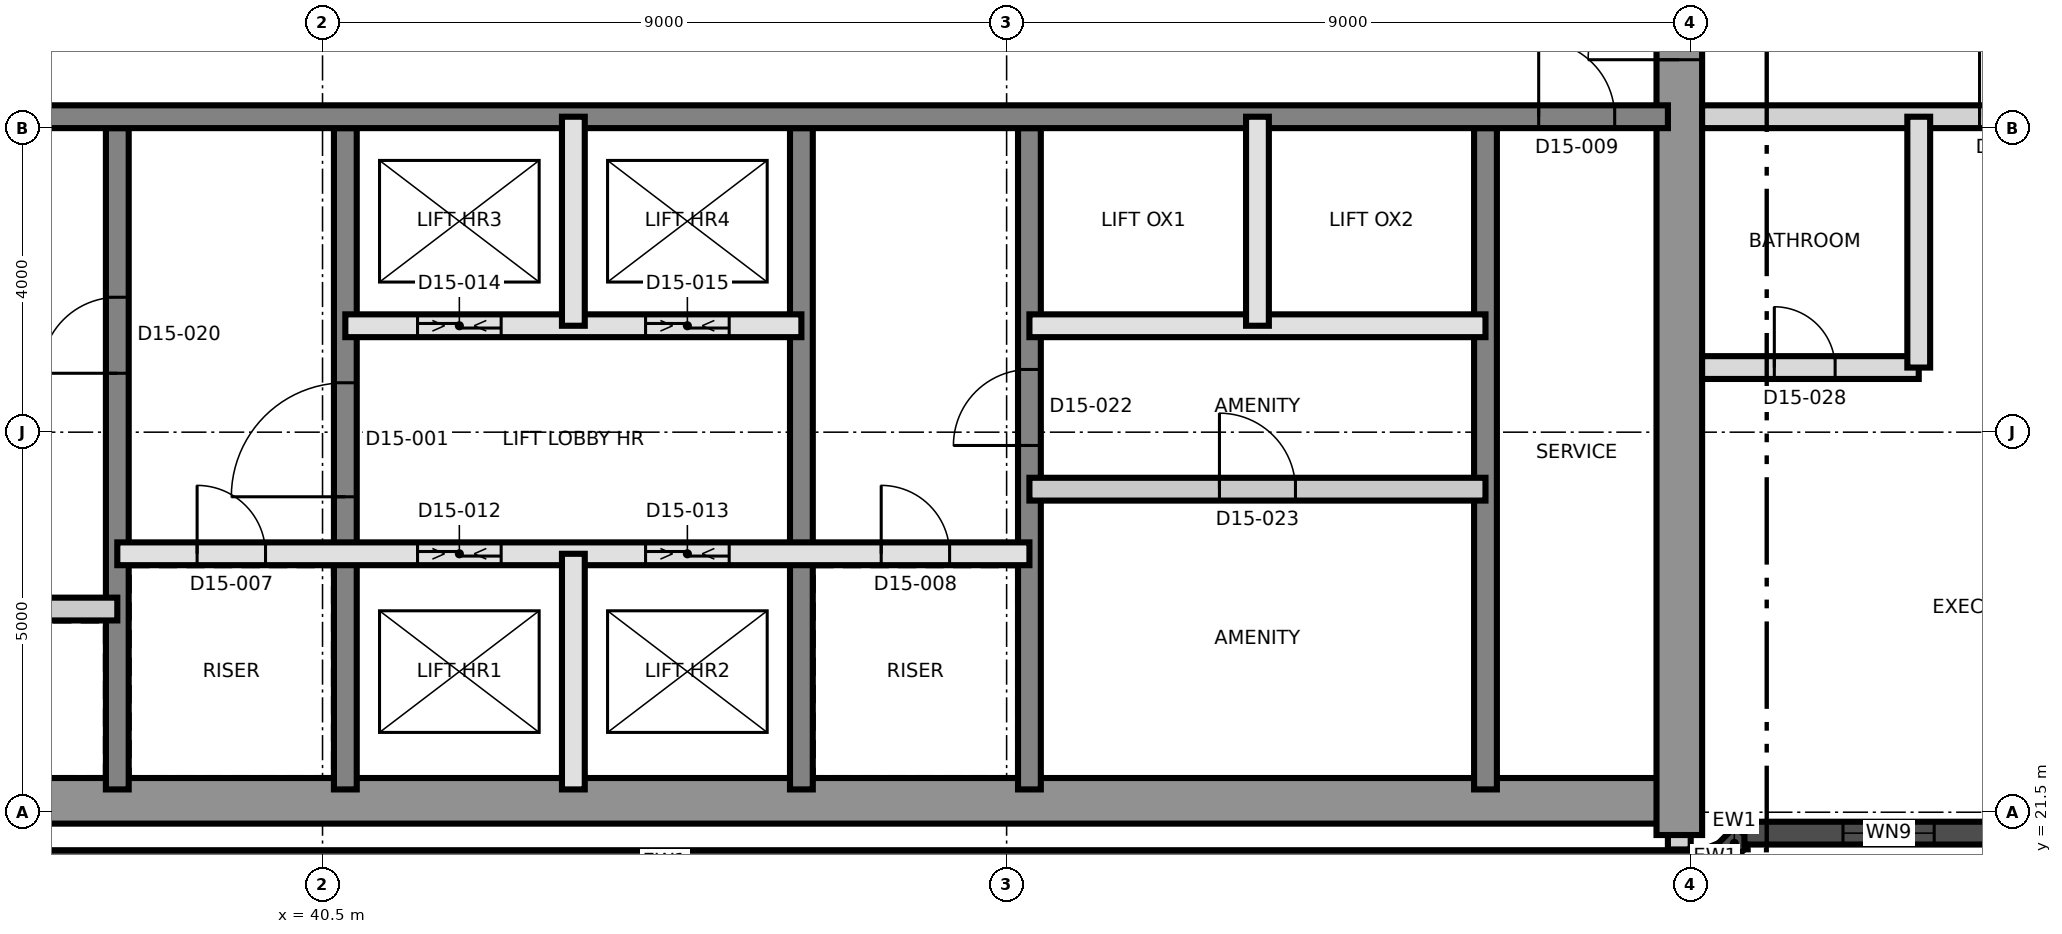
"""IFC4 building model, lengths in metres.
Left out: names, types, materials, properties, quantities, classifications, styles, units other than length and angle.
Written with IfcOpenShell. Run it as: python <this file> out.ifc"""

import sys

from ifc_helpers import new_model, si_unit, direction, frame, frame_2d, origin, place, context, subcontext, project, spatial, rectangle, extrude, element, fill, save


model = new_model("IFC4")
c1 = context("Model", 3, precision=1e-05, world=origin(), true_north=direction((0.0, 1.0)))
c2 = subcontext(c1, "Body", "Model", "MODEL_VIEW")
j1 = project(units=[si_unit("LENGTHUNIT", "METRE"), si_unit("PLANEANGLEUNIT", "RADIAN")], contexts=[c1])
p1 = place(None, origin())
s1 = spatial("IfcSite", under=j1, at=p1, CompositionType="ELEMENT")
p2 = place(p1, origin())
s2 = spatial("IfcBuilding", under=s1, at=p2, CompositionType="ELEMENT")
p3 = place(p2, frame((0.0, 0.0, 157.0)))
s3 = spatial("IfcBuildingStorey", under=s2, at=p3, CompositionType="ELEMENT", Elevation=157.0)
p4 = place(p3, frame((31.2, 21.65, 0.0), z_axis=(0.0, 0.0, 1.0), x_axis=(1.0, 0.0, 0.0)))
e1 = element("IfcWall", 1, at=p4, inside=s3, PredefinedType="SHEAR", context=c2, shape_type="SweptSolid", body=[
    extrude(rectangle(XDim=27.0, YDim=0.6, at=frame_2d((13.5, 0.0))), origin(), (0.0, 0.0, 1.0), 3.7),
])
p5 = place(p3, frame((58.35, 21.2, 0.0), z_axis=(0.0, 0.0, 1.0), x_axis=(0.0, 1.0, 0.0)))
e2 = element("IfcWall", 2, at=p5, inside=s3, PredefinedType="SHEAR", context=c2, shape_type="SweptSolid", body=[
    extrude(rectangle(XDim=18.6, YDim=0.6, at=frame_2d((9.3, 0.0))), origin(), (0.0, 0.0, 1.0), 3.7),
])
p6 = place(p5, frame((10.2, 0.0, 0.0)))
e3 = element("IfcOpeningElement", 3, at=p6, cuts=e2, PredefinedType="OPENING", context=c2, shape_type="SweptSolid", body=[
    extrude(rectangle(XDim=1.2, YDim=2.1, at=frame_2d((0.6, 1.05))), frame((0.0, 0.31, 0.0), z_axis=(0.0, -1.0, 0.0), x_axis=(1.0, 0.0, 0.0)), (0.0, 0.0, 1.0), 0.62),
])
p7 = place(p3, frame((37.8, 21.8, 0.0), z_axis=(0.0, 0.0, 1.0), x_axis=(0.0, 1.0, 0.0)))
e4 = element("IfcWall", 4, at=p7, inside=s3, PredefinedType="SHEAR", context=c2, shape_type="SweptSolid", body=[
    extrude(rectangle(XDim=8.7, YDim=0.3, at=frame_2d((4.35, 0.0))), origin(), (0.0, 0.0, 1.0), 3.7),
])
p8 = place(p7, frame((5.475, 0.0, 0.0)))
e5 = element("IfcOpeningElement", 5, at=p8, cuts=e4, PredefinedType="OPENING", context=c2, shape_type="SweptSolid", body=[
    extrude(rectangle(XDim=1.0, YDim=2.1, at=frame_2d((0.5, 1.05))), frame((0.0, 0.16, 0.0), z_axis=(0.0, -1.0, 0.0), x_axis=(1.0, 0.0, 0.0)), (0.0, 0.0, 1.0), 0.32),
])
p9 = place(p3, frame((40.8, 21.8, 0.0), z_axis=(0.0, 0.0, 1.0), x_axis=(0.0, 1.0, 0.0)))
e6 = element("IfcWall", 6, at=p9, inside=s3, PredefinedType="SHEAR", context=c2, shape_type="SweptSolid", body=[
    extrude(rectangle(XDim=8.7, YDim=0.3, at=frame_2d((4.35, 0.0))), origin(), (0.0, 0.0, 1.0), 3.7),
])
p10 = place(p9, frame((3.85, 0.0, 0.0)))
e7 = element("IfcOpeningElement", 7, at=p10, cuts=e6, PredefinedType="OPENING", context=c2, shape_type="SweptSolid", body=[
    extrude(rectangle(XDim=1.5, YDim=2.1, at=frame_2d((0.75, 1.05))), frame((0.0, 0.16, 0.0), z_axis=(0.0, -1.0, 0.0), x_axis=(1.0, 0.0, 0.0)), (0.0, 0.0, 1.0), 0.32),
])
p11 = place(p3, frame((46.8, 21.8, 0.0), z_axis=(0.0, 0.0, 1.0), x_axis=(0.0, 1.0, 0.0)))
e8 = element("IfcWall", 8, at=p11, inside=s3, PredefinedType="SHEAR", context=c2, shape_type="SweptSolid", body=[
    extrude(rectangle(XDim=8.7, YDim=0.3, at=frame_2d((4.35, 0.0))), origin(), (0.0, 0.0, 1.0), 3.7),
])
p12 = place(p3, frame((49.8, 21.8, 0.0), z_axis=(0.0, 0.0, 1.0), x_axis=(0.0, 1.0, 0.0)))
e9 = element("IfcWall", 9, at=p12, inside=s3, PredefinedType="SHEAR", context=c2, shape_type="SweptSolid", body=[
    extrude(rectangle(XDim=8.7, YDim=0.3, at=frame_2d((4.35, 0.0))), origin(), (0.0, 0.0, 1.0), 3.7),
])
p13 = place(p12, frame((4.525, 0.0, 0.0)))
e10 = element("IfcOpeningElement", 10, at=p13, cuts=e9, PredefinedType="OPENING", context=c2, shape_type="SweptSolid", body=[
    extrude(rectangle(XDim=1.0, YDim=2.1, at=frame_2d((0.5, 1.05))), frame((0.0, 0.16, 0.0), z_axis=(0.0, -1.0, 0.0), x_axis=(1.0, 0.0, 0.0)), (0.0, 0.0, 1.0), 0.32),
])
p14 = place(p3, frame((55.8, 21.8, 0.0), z_axis=(0.0, 0.0, 1.0), x_axis=(0.0, 1.0, 0.0)))
e11 = element("IfcWall", 11, at=p14, inside=s3, PredefinedType="SHEAR", context=c2, shape_type="SweptSolid", body=[
    extrude(rectangle(XDim=8.7, YDim=0.3, at=frame_2d((4.35, 0.0))), origin(), (0.0, 0.0, 1.0), 3.7),
])
p15 = place(p3, frame((31.8, 30.65, 0.0), z_axis=(0.0, 0.0, 1.0), x_axis=(1.0, 0.0, 0.0)))
e12 = element("IfcWall", 12, at=p15, inside=s3, PredefinedType="SHEAR", context=c2, shape_type="SweptSolid", body=[
    extrude(rectangle(XDim=26.4, YDim=0.3, at=frame_2d((13.2, 0.0))), origin(), (0.0, 0.0, 1.0), 3.7),
])
p16 = place(p15, frame((24.7, 0.0, 0.0)))
e13 = element("IfcOpeningElement", 13, at=p16, cuts=e12, PredefinedType="OPENING", context=c2, shape_type="SweptSolid", body=[
    extrude(rectangle(XDim=1.0, YDim=2.1, at=frame_2d((0.5, 1.05))), frame((0.0, 0.16, 0.0), z_axis=(0.0, -1.0, 0.0), x_axis=(1.0, 0.0, 0.0)), (0.0, 0.0, 1.0), 0.32),
])
p17 = place(p3, frame((31.36, 20.85, 0.0), z_axis=(0.0, 0.0, 1.0), x_axis=(1.0, 0.0, 0.0)))
e14 = element("IfcWall", 14, at=p17, inside=s3, PredefinedType="SOLIDWALL", context=c2, shape_type="SweptSolid", body=[
    extrude(rectangle(XDim=27.281, YDim=0.3, at=frame_2d((13.64, 0.0))), origin(), (0.0, 0.0, 1.0), 3.4),
])
p18 = place(p3, frame((58.698, 20.861, 0.0), z_axis=(0.0, 0.0, 1.0), x_axis=(0.923757413239, 0.38297812142, 0.0)))
e15 = element("IfcWall", 15, at=p18, inside=s3, PredefinedType="SOLIDWALL", context=c2, shape_type="SweptSolid", body=[
    extrude(rectangle(XDim=0.275, YDim=0.3, at=frame_2d((0.138, 0.0))), origin(), (0.0, 0.0, 1.0), 3.4),
])
p19 = place(p3, frame((58.952, 20.967, 0.0), z_axis=(0.0, 0.0, 1.0), x_axis=(0.702144810536, 0.712034174065, 0.0)))
e16 = element("IfcWall", 16, at=p19, inside=s3, PredefinedType="SOLIDWALL", context=c2, shape_type="SweptSolid", body=[
    extrude(rectangle(XDim=0.346, YDim=0.3, at=frame_2d((0.173, 0.0))), origin(), (0.0, 0.0, 1.0), 3.4),
])
p20 = place(p3, frame((59.207, 21.225, 0.0), z_axis=(0.0, 0.0, 1.0), x_axis=(1.0, 0.0, 0.0)))
e17 = element("IfcWall", 17, at=p20, inside=s3, PredefinedType="SOLIDWALL", context=c2, shape_type="SweptSolid", body=[
    extrude(rectangle(XDim=8.213, YDim=0.3, at=frame_2d((4.106, 0.0))), origin(), (0.0, 0.0, 1.0), 3.4),
])
p21 = place(p20, frame((1.297, 0.0, 0.9)))
e18 = element("IfcOpeningElement", 18, at=p21, cuts=e17, PredefinedType="OPENING", context=c2, shape_type="SweptSolid", body=[
    extrude(rectangle(XDim=1.2, YDim=1.5, at=frame_2d((0.6, 0.75))), frame((0.0, 0.16, 0.0), z_axis=(0.0, -1.0, 0.0), x_axis=(1.0, 0.0, 0.0)), (0.0, 0.0, 1.0), 0.32),
])
p22 = place(p20, frame((4.003, 0.0, 0.9)))
e19 = element("IfcOpeningElement", 19, at=p22, cuts=e17, PredefinedType="OPENING", context=c2, shape_type="SweptSolid", body=[
    extrude(rectangle(XDim=3.6, YDim=1.5, at=frame_2d((1.8, 0.75))), frame((0.0, 0.16, 0.0), z_axis=(0.0, -1.0, 0.0), x_axis=(1.0, 0.0, 0.0)), (0.0, 0.0, 1.0), 0.32),
])
p23 = place(p3, frame((31.8, 24.173, 0.0), z_axis=(0.0, 0.0, 1.0), x_axis=(1.0, 0.0, 0.0)))
e20 = element("IfcWall", 20, at=p23, inside=s3, PredefinedType="PARTITIONING", context=c2, shape_type="SweptSolid", body=[
    extrude(rectangle(XDim=6.0, YDim=0.3, at=frame_2d((3.0, 0.0))), origin(), (0.0, 0.0, 1.0), 3.4),
])
p24 = place(p23, frame((2.5, 0.0, 0.0)))
e21 = element("IfcOpeningElement", 21, at=p24, cuts=e20, PredefinedType="OPENING", context=c2, shape_type="SweptSolid", body=[
    extrude(rectangle(XDim=1.0, YDim=2.1, at=frame_2d((0.5, 1.05))), frame((0.0, 0.16, 0.0), z_axis=(0.0, -1.0, 0.0), x_axis=(1.0, 0.0, 0.0)), (0.0, 0.0, 1.0), 0.32),
])
p25 = place(p3, frame((37.8, 24.9, 0.0), z_axis=(0.0, 0.0, 1.0), x_axis=(1.0, 0.0, 0.0)))
e22 = element("IfcWall", 22, at=p25, inside=s3, PredefinedType="SOLIDWALL", context=c2, shape_type="SweptSolid", body=[
    extrude(rectangle(XDim=12.0, YDim=0.3, at=frame_2d((6.0, 0.0))), origin(), (0.0, 0.0, 1.0), 3.4),
])
p26 = place(p25, frame((1.05, 0.0, 0.0)))
e23 = element("IfcOpeningElement", 23, at=p26, cuts=e22, PredefinedType="OPENING", context=c2, shape_type="SweptSolid", body=[
    extrude(rectangle(XDim=0.9, YDim=2.1, at=frame_2d((0.45, 1.05))), frame((0.0, 0.16, 0.0), z_axis=(0.0, -1.0, 0.0), x_axis=(1.0, 0.0, 0.0)), (0.0, 0.0, 1.0), 0.32),
])
p27 = place(p25, frame((10.05, 0.0, 0.0)))
e24 = element("IfcOpeningElement", 24, at=p27, cuts=e22, PredefinedType="OPENING", context=c2, shape_type="SweptSolid", body=[
    extrude(rectangle(XDim=0.9, YDim=2.1, at=frame_2d((0.45, 1.05))), frame((0.0, 0.16, 0.0), z_axis=(0.0, -1.0, 0.0), x_axis=(1.0, 0.0, 0.0)), (0.0, 0.0, 1.0), 0.32),
])
p28 = place(p25, frame((3.95, 0.0, 0.0)))
e25 = element("IfcOpeningElement", 25, at=p28, cuts=e22, PredefinedType="OPENING", context=c2, shape_type="SweptSolid", body=[
    extrude(rectangle(XDim=1.1, YDim=2.4, at=frame_2d((0.55, 1.2))), frame((0.0, 0.16, 0.0), z_axis=(0.0, -1.0, 0.0), x_axis=(1.0, 0.0, 0.0)), (0.0, 0.0, 1.0), 0.32),
])
p29 = place(p25, frame((6.95, 0.0, 0.0)))
e26 = element("IfcOpeningElement", 26, at=p29, cuts=e22, PredefinedType="OPENING", context=c2, shape_type="SweptSolid", body=[
    extrude(rectangle(XDim=1.1, YDim=2.4, at=frame_2d((0.55, 1.2))), frame((0.0, 0.16, 0.0), z_axis=(0.0, -1.0, 0.0), x_axis=(1.0, 0.0, 0.0)), (0.0, 0.0, 1.0), 0.32),
])
p30 = place(p3, frame((49.8, 25.75, 0.0), z_axis=(0.0, 0.0, 1.0), x_axis=(1.0, 0.0, 0.0)))
e27 = element("IfcWall", 27, at=p30, inside=s3, PredefinedType="PARTITIONING", context=c2, shape_type="SweptSolid", body=[
    extrude(rectangle(XDim=6.0, YDim=0.3, at=frame_2d((3.0, 0.0))), origin(), (0.0, 0.0, 1.0), 3.4),
])
p31 = place(p30, frame((2.5, 0.0, 0.0)))
e28 = element("IfcOpeningElement", 28, at=p31, cuts=e27, PredefinedType="OPENING", context=c2, shape_type="SweptSolid", body=[
    extrude(rectangle(XDim=1.0, YDim=2.1, at=frame_2d((0.5, 1.05))), frame((0.0, 0.16, 0.0), z_axis=(0.0, -1.0, 0.0), x_axis=(1.0, 0.0, 0.0)), (0.0, 0.0, 1.0), 0.32),
])
p32 = place(p3, frame((40.8, 27.9, 0.0), z_axis=(0.0, 0.0, 1.0), x_axis=(1.0, 0.0, 0.0)))
e29 = element("IfcWall", 29, at=p32, inside=s3, PredefinedType="SOLIDWALL", context=c2, shape_type="SweptSolid", body=[
    extrude(rectangle(XDim=6.0, YDim=0.3, at=frame_2d((3.0, 0.0))), origin(), (0.0, 0.0, 1.0), 3.4),
])
p33 = place(p32, frame((0.95, 0.0, 0.0)))
e30 = element("IfcOpeningElement", 30, at=p33, cuts=e29, PredefinedType="OPENING", context=c2, shape_type="SweptSolid", body=[
    extrude(rectangle(XDim=1.1, YDim=2.4, at=frame_2d((0.55, 1.2))), frame((0.0, 0.16, 0.0), z_axis=(0.0, -1.0, 0.0), x_axis=(1.0, 0.0, 0.0)), (0.0, 0.0, 1.0), 0.32),
])
p34 = place(p32, frame((3.95, 0.0, 0.0)))
e31 = element("IfcOpeningElement", 31, at=p34, cuts=e29, PredefinedType="OPENING", context=c2, shape_type="SweptSolid", body=[
    extrude(rectangle(XDim=1.1, YDim=2.4, at=frame_2d((0.55, 1.2))), frame((0.0, 0.16, 0.0), z_axis=(0.0, -1.0, 0.0), x_axis=(1.0, 0.0, 0.0)), (0.0, 0.0, 1.0), 0.32),
])
p35 = place(p3, frame((49.8, 27.9, 0.0), z_axis=(0.0, 0.0, 1.0), x_axis=(1.0, 0.0, 0.0)))
e32 = element("IfcWall", 32, at=p35, inside=s3, PredefinedType="SOLIDWALL", context=c2, shape_type="SweptSolid", body=[
    extrude(rectangle(XDim=6.0, YDim=0.3, at=frame_2d((3.0, 0.0))), origin(), (0.0, 0.0, 1.0), 3.4),
])
p36 = place(p3, frame((43.8, 21.8, 0.0), z_axis=(0.0, 0.0, 1.0), x_axis=(0.0, 1.0, 0.0)))
e33 = element("IfcWall", 33, at=p36, inside=s3, PredefinedType="SOLIDWALL", context=c2, shape_type="SweptSolid", body=[
    extrude(rectangle(XDim=3.1, YDim=0.3, at=frame_2d((1.55, 0.0))), origin(), (0.0, 0.0, 1.0), 3.4),
])
for number, where, z_axis, x_axis in (
    (34, (43.8, 27.9, 0.0), (0.0, 0.0, 1.0), (0.0, 1.0, 0.0)),
    (35, (52.8, 27.9, 0.0), (0.0, 0.0, 1.0), (0.0, 1.0, 0.0)),
):
    element("IfcWall", number, at=place(p3, frame(where, z_axis=z_axis, x_axis=x_axis)), inside=s3, PredefinedType="SOLIDWALL", context=c2, shape_type="SweptSolid", body=[
        extrude(rectangle(XDim=2.75, YDim=0.3, at=frame_2d((1.375, 0.0))), origin(), (0.0, 0.0, 1.0), 3.4),
    ])
p37 = place(p3, frame((58.65, 27.35, 0.0), z_axis=(0.0, 0.0, 1.0), x_axis=(1.0, 0.0, 0.0)))
e36 = element("IfcWall", 36, at=p37, inside=s3, PredefinedType="PARTITIONING", context=c2, shape_type="SweptSolid", body=[
    extrude(rectangle(XDim=2.85, YDim=0.3, at=frame_2d((1.425, 0.0))), origin(), (0.0, 0.0, 1.0), 3.4),
])
p38 = place(p37, frame((0.95, 0.0, 0.0)))
e37 = element("IfcOpeningElement", 37, at=p38, cuts=e36, PredefinedType="OPENING", context=c2, shape_type="SweptSolid", body=[
    extrude(rectangle(XDim=0.8, YDim=2.1, at=frame_2d((0.4, 1.05))), frame((0.0, 0.16, 0.0), z_axis=(0.0, -1.0, 0.0), x_axis=(1.0, 0.0, 0.0)), (0.0, 0.0, 1.0), 0.32),
])
p39 = place(p3, frame((58.65, 30.65, 0.0), z_axis=(0.0, 0.0, 1.0), x_axis=(1.0, 0.0, 0.0)))
e38 = element("IfcWall", 38, at=p39, inside=s3, PredefinedType="PARTITIONING", context=c2, shape_type="SweptSolid", body=[
    extrude(rectangle(XDim=8.5, YDim=0.3, at=frame_2d((4.25, 0.0))), origin(), (0.0, 0.0, 1.0), 3.4),
])
p40 = place(p39, frame((3.65, 0.0, 0.0)))
e39 = element("IfcOpeningElement", 39, at=p40, cuts=e38, PredefinedType="OPENING", context=c2, shape_type="SweptSolid", body=[
    extrude(rectangle(XDim=1.0, YDim=2.4, at=frame_2d((0.5, 1.2))), frame((0.0, 0.16, 0.0), z_axis=(0.0, -1.0, 0.0), x_axis=(1.0, 0.0, 0.0)), (0.0, 0.0, 1.0), 0.32),
])
p41 = place(p3, frame((61.5, 27.35, 0.0), z_axis=(0.0, 0.0, 1.0), x_axis=(0.0, 1.0, 0.0)))
e40 = element("IfcWall", 40, at=p41, inside=s3, PredefinedType="PARTITIONING", context=c2, shape_type="SweptSolid", body=[
    extrude(rectangle(XDim=3.3, YDim=0.3, at=frame_2d((1.65, 0.0))), origin(), (0.0, 0.0, 1.0), 3.4),
])
p42 = place(p3, frame((58.35, 21.2, 0.0), z_axis=(0.0, 0.0, 1.0), x_axis=(0.0, -1.0, 0.0)))
e41 = element("IfcWall", 41, at=p42, inside=s3, PredefinedType="PARTITIONING", context=c2, shape_type="SweptSolid", body=[
    extrude(rectangle(XDim=0.19, YDim=0.3, at=frame_2d((0.095, 0.0))), origin(), (0.0, 0.0, 1.0), 3.4),
])
p43 = place(p21, origin())
e42 = element("IfcWindow", 42, at=p43, inside=s3, PartitioningType="SINGLE_PANEL", PredefinedType="WINDOW", context=c2, shape_type="SweptSolid", body=[
    extrude(rectangle(XDim=1.2, YDim=1.5, at=frame_2d((0.6, 0.75))), frame((0.0, 0.03, 0.0), z_axis=(0.0, -1.0, 0.0), x_axis=(1.0, 0.0, 0.0)), (0.0, 0.0, 1.0), 0.06),
])
fill(e18, e42)
p44 = place(p10, origin())
e43 = element("IfcDoor", 43, at=p44, inside=s3, OperationType="SINGLE_SWING_RIGHT", PredefinedType="DOOR", context=c2, shape_type="SweptSolid", body=[
    extrude(rectangle(XDim=1.5, YDim=2.1, at=frame_2d((0.75, 1.05))), frame((0.0, 0.025, 0.0), z_axis=(0.0, -1.0, 0.0), x_axis=(1.0, 0.0, 0.0)), (0.0, 0.0, 1.0), 0.05),
])
fill(e7, e43)
p45 = place(p26, origin())
e44 = element("IfcDoor", 44, at=p45, inside=s3, OperationType="SINGLE_SWING_LEFT", PredefinedType="DOOR", context=c2, shape_type="SweptSolid", body=[
    extrude(rectangle(XDim=0.9, YDim=2.1, at=frame_2d((0.45, 1.05))), frame((0.0, 0.025, 0.0), z_axis=(0.0, -1.0, 0.0), x_axis=(1.0, 0.0, 0.0)), (0.0, 0.0, 1.0), 0.05),
])
fill(e23, e44)
p46 = place(p27, origin())
e45 = element("IfcDoor", 45, at=p46, inside=s3, OperationType="SINGLE_SWING_RIGHT", PredefinedType="DOOR", context=c2, shape_type="SweptSolid", body=[
    extrude(rectangle(XDim=0.9, YDim=2.1, at=frame_2d((0.45, 1.05))), frame((0.0, 0.025, 0.0), z_axis=(0.0, -1.0, 0.0), x_axis=(1.0, 0.0, 0.0)), (0.0, 0.0, 1.0), 0.05),
])
fill(e24, e45)
p47 = place(p16, origin())
e46 = element("IfcDoor", 46, at=p47, inside=s3, OperationType="SINGLE_SWING_LEFT", PredefinedType="DOOR", context=c2, shape_type="SweptSolid", body=[
    extrude(rectangle(XDim=1.0, YDim=2.1, at=frame_2d((0.5, 1.05))), frame((0.0, 0.025, 0.0), z_axis=(0.0, -1.0, 0.0), x_axis=(1.0, 0.0, 0.0)), (0.0, 0.0, 1.0), 0.05),
])
fill(e13, e46)
p48 = place(p6, origin())
e47 = element("IfcDoor", 47, at=p48, inside=s3, OperationType="SINGLE_SWING_LEFT", PredefinedType="DOOR", context=c2, shape_type="SweptSolid", body=[
    extrude(rectangle(XDim=1.2, YDim=2.1, at=frame_2d((0.6, 1.05))), frame((0.0, 0.025, 0.0), z_axis=(0.0, -1.0, 0.0), x_axis=(1.0, 0.0, 0.0)), (0.0, 0.0, 1.0), 0.05),
])
fill(e3, e47)
p49 = place(p28, origin())
e48 = element("IfcDoor", 48, at=p49, inside=s3, OperationType="SLIDING_TO_LEFT", PredefinedType="DOOR", context=c2, shape_type="SweptSolid", body=[
    extrude(rectangle(XDim=1.1, YDim=2.4, at=frame_2d((0.55, 1.2))), frame((0.0, 0.025, 0.0), z_axis=(0.0, -1.0, 0.0), x_axis=(1.0, 0.0, 0.0)), (0.0, 0.0, 1.0), 0.05),
])
fill(e25, e48)
p50 = place(p29, origin())
e49 = element("IfcDoor", 49, at=p50, inside=s3, OperationType="SLIDING_TO_LEFT", PredefinedType="DOOR", context=c2, shape_type="SweptSolid", body=[
    extrude(rectangle(XDim=1.1, YDim=2.4, at=frame_2d((0.55, 1.2))), frame((0.0, 0.025, 0.0), z_axis=(0.0, -1.0, 0.0), x_axis=(1.0, 0.0, 0.0)), (0.0, 0.0, 1.0), 0.05),
])
fill(e26, e49)
p51 = place(p33, origin())
e50 = element("IfcDoor", 50, at=p51, inside=s3, OperationType="SLIDING_TO_LEFT", PredefinedType="DOOR", context=c2, shape_type="SweptSolid", body=[
    extrude(rectangle(XDim=1.1, YDim=2.4, at=frame_2d((0.55, 1.2))), frame((0.0, 0.025, 0.0), z_axis=(0.0, -1.0, 0.0), x_axis=(1.0, 0.0, 0.0)), (0.0, 0.0, 1.0), 0.05),
])
fill(e30, e50)
p52 = place(p34, origin())
e51 = element("IfcDoor", 51, at=p52, inside=s3, OperationType="SLIDING_TO_LEFT", PredefinedType="DOOR", context=c2, shape_type="SweptSolid", body=[
    extrude(rectangle(XDim=1.1, YDim=2.4, at=frame_2d((0.55, 1.2))), frame((0.0, 0.025, 0.0), z_axis=(0.0, -1.0, 0.0), x_axis=(1.0, 0.0, 0.0)), (0.0, 0.0, 1.0), 0.05),
])
fill(e31, e51)
p53 = place(p8, origin())
e52 = element("IfcDoor", 52, at=p53, inside=s3, OperationType="SINGLE_SWING_LEFT", PredefinedType="DOOR", context=c2, shape_type="SweptSolid", body=[
    extrude(rectangle(XDim=1.0, YDim=2.1, at=frame_2d((0.5, 1.05))), frame((0.0, 0.025, 0.0), z_axis=(0.0, -1.0, 0.0), x_axis=(1.0, 0.0, 0.0)), (0.0, 0.0, 1.0), 0.05),
])
fill(e5, e52)
p54 = place(p13, origin())
e53 = element("IfcDoor", 53, at=p54, inside=s3, OperationType="SINGLE_SWING_LEFT", PredefinedType="DOOR", context=c2, shape_type="SweptSolid", body=[
    extrude(rectangle(XDim=1.0, YDim=2.1, at=frame_2d((0.5, 1.05))), frame((0.0, 0.025, 0.0), z_axis=(0.0, -1.0, 0.0), x_axis=(1.0, 0.0, 0.0)), (0.0, 0.0, 1.0), 0.05),
])
fill(e10, e53)
p55 = place(p31, origin())
e54 = element("IfcDoor", 54, at=p55, inside=s3, OperationType="SINGLE_SWING_RIGHT", PredefinedType="DOOR", context=c2, shape_type="SweptSolid", body=[
    extrude(rectangle(XDim=1.0, YDim=2.1, at=frame_2d((0.5, 1.05))), frame((0.0, 0.025, 0.0), z_axis=(0.0, -1.0, 0.0), x_axis=(1.0, 0.0, 0.0)), (0.0, 0.0, 1.0), 0.05),
])
fill(e28, e54)
p56 = place(p38, origin())
e55 = element("IfcDoor", 55, at=p56, inside=s3, OperationType="SINGLE_SWING_LEFT", PredefinedType="DOOR", context=c2, shape_type="SweptSolid", body=[
    extrude(rectangle(XDim=0.8, YDim=2.1, at=frame_2d((0.4, 1.05))), frame((0.0, 0.025, 0.0), z_axis=(0.0, -1.0, 0.0), x_axis=(1.0, 0.0, 0.0)), (0.0, 0.0, 1.0), 0.05),
])
fill(e37, e55)
p57 = place(p40, origin())
e56 = element("IfcDoor", 56, at=p57, inside=s3, OperationType="SINGLE_SWING_LEFT", PredefinedType="DOOR", context=c2, shape_type="SweptSolid", body=[
    extrude(rectangle(XDim=1.0, YDim=2.4, at=frame_2d((0.5, 1.2))), frame((0.0, 0.025, 0.0), z_axis=(0.0, -1.0, 0.0), x_axis=(1.0, 0.0, 0.0)), (0.0, 0.0, 1.0), 0.05),
])
fill(e39, e56)
save(model, sys.argv[1])
